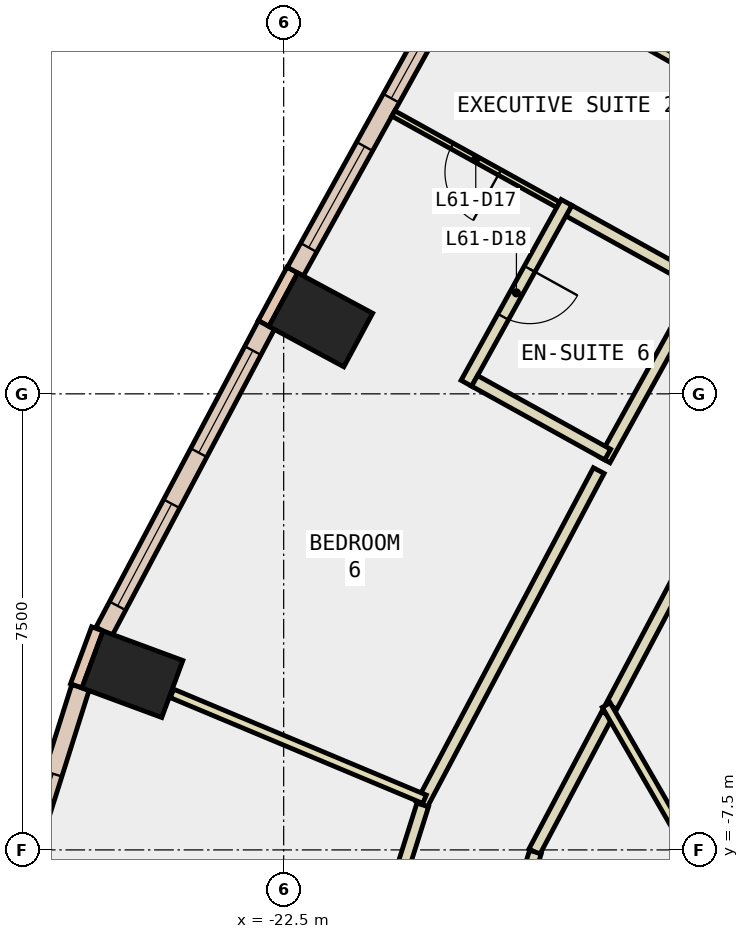
"""IFC4 building model, lengths in metres.
Left out: names, types, materials, properties, quantities, classifications, styles, units other than length and angle.
Written with IfcOpenShell. Run it as: python <this file> out.ifc"""

import sys

from ifc_helpers import new_model, si_unit, direction, frame, frame_2d, origin, origin_2d, place, context, subcontext, project, spatial, rectangle, extrude, element, fill, save


model = new_model("IFC4")
c1 = context("Model", 3, precision=1e-05, world=origin(), true_north=direction((0.0, 1.0)))
c2 = subcontext(c1, "Body", "Model", "MODEL_VIEW")
j1 = project(units=[si_unit("LENGTHUNIT", "METRE"), si_unit("PLANEANGLEUNIT", "RADIAN")], contexts=[c1])
p1 = place(None, origin())
s1 = spatial("IfcSite", under=j1, at=p1, CompositionType="ELEMENT")
p2 = place(p1, origin())
s2 = spatial("IfcBuilding", under=s1, at=p2, CompositionType="ELEMENT")
p3 = place(p2, frame((0.0, 0.0, 266.6)))
s3 = spatial("IfcBuildingStorey", under=s2, at=p3, CompositionType="ELEMENT", Elevation=266.6)
for number, where, z_axis, x_axis in (
    (1, (-21.89, 1.217, -0.34), (0.0, 0.0, 1.0), (0.474, 0.881, 0.0)),
    (2, (-24.988, -4.611, -0.34), (0.0, 0.0, 1.0), (0.347, 0.938, 0.0)),
):
    element("IfcColumn", number, at=place(p3, frame(where, z_axis=z_axis, x_axis=x_axis)), inside=s3, PredefinedType="COLUMN", context=c2, shape_type="SweptSolid", body=[
        extrude(rectangle(XDim=1.0, YDim=1.4, at=origin_2d()), origin(), (0.0, 0.0, 1.0), 3.6),
    ])
p4 = place(p3, frame((-22.357, 2.037, 0.0), z_axis=(0.0, 0.0, 1.0), x_axis=(-0.473852444207, -0.880604259085, 0.0)))
e3 = element("IfcWall", 3, at=p4, inside=s3, PredefinedType="STANDARD", context=c2, shape_type="SweptSolid", body=[
    extrude(rectangle(XDim=1.0, YDim=0.2, at=frame_2d((0.5, 0.0))), origin(), (0.0, 0.0, 1.0), 3.26),
])
p5 = place(p3, frame((-25.565, -3.865, 0.0), z_axis=(0.0, 0.0, 1.0), x_axis=(-0.347107644204, -0.937825294677, 0.0)))
e4 = element("IfcWall", 4, at=p5, inside=s3, PredefinedType="STANDARD", context=c2, shape_type="SweptSolid", body=[
    extrude(rectangle(XDim=1.0, YDim=0.2, at=frame_2d((0.5, 0.0))), origin(), (0.0, 0.0, 1.0), 3.26),
])
p6 = place(p3, frame((-19.591, 6.919, 0.0), z_axis=(0.0, 0.0, 1.0), x_axis=(-0.484260568952, -0.874923826032, 0.0)))
e5 = element("IfcWall", 5, at=p6, inside=s3, PredefinedType="STANDARD", context=c2, shape_type="SweptSolid", body=[
    extrude(rectangle(XDim=5.611, YDim=0.3, at=frame_2d((2.805, 0.0))), origin(), (0.0, 0.0, 1.0), 3.26),
])
p7 = place(p6, frame((0.453, 0.0, 0.9)))
e6 = element("IfcOpeningElement", 6, at=p7, cuts=e5, PredefinedType="OPENING", context=c2, shape_type="SweptSolid", body=[
    extrude(rectangle(XDim=1.9, YDim=2.0, at=frame_2d((0.95, 1.0))), frame((0.0, 0.16, 0.0), z_axis=(0.0, -1.0, 0.0), x_axis=(1.0, 0.0, 0.0)), (0.0, 0.0, 1.0), 0.32),
])
p8 = place(p6, frame((3.258, 0.0, 0.9)))
e7 = element("IfcOpeningElement", 7, at=p8, cuts=e5, PredefinedType="OPENING", context=c2, shape_type="SweptSolid", body=[
    extrude(rectangle(XDim=1.9, YDim=2.0, at=frame_2d((0.95, 1.0))), frame((0.0, 0.16, 0.0), z_axis=(0.0, -1.0, 0.0), x_axis=(1.0, 0.0, 0.0)), (0.0, 0.0, 1.0), 0.32),
])
p9 = place(p3, frame((-22.784, 1.132, 0.0), z_axis=(0.0, 0.0, 1.0), x_axis=(-0.468220106253, -0.883611867338, 0.0)))
e8 = element("IfcWall", 8, at=p9, inside=s3, PredefinedType="STANDARD", context=c2, shape_type="SweptSolid", body=[
    extrude(rectangle(XDim=5.703, YDim=0.3, at=frame_2d((2.852, 0.0))), origin(), (0.0, 0.0, 1.0), 3.26),
])
p10 = place(p9, frame((0.476, 0.0, 0.9)))
e9 = element("IfcOpeningElement", 9, at=p10, cuts=e8, PredefinedType="OPENING", context=c2, shape_type="SweptSolid", body=[
    extrude(rectangle(XDim=1.9, YDim=2.0, at=frame_2d((0.95, 1.0))), frame((0.0, 0.16, 0.0), z_axis=(0.0, -1.0, 0.0), x_axis=(1.0, 0.0, 0.0)), (0.0, 0.0, 1.0), 0.32),
])
p11 = place(p9, frame((3.327, 0.0, 0.9)))
e10 = element("IfcOpeningElement", 10, at=p11, cuts=e8, PredefinedType="OPENING", context=c2, shape_type="SweptSolid", body=[
    extrude(rectangle(XDim=1.9, YDim=2.0, at=frame_2d((0.95, 1.0))), frame((0.0, 0.16, 0.0), z_axis=(0.0, -1.0, 0.0), x_axis=(1.0, 0.0, 0.0)), (0.0, 0.0, 1.0), 0.32),
])
p12 = place(p3, frame((-25.842, -4.827, 0.0), z_axis=(0.0, 0.0, 1.0), x_axis=(-0.30108868778, -0.953596142028, 0.0)))
e11 = element("IfcWall", 11, at=p12, inside=s3, PredefinedType="STANDARD", context=c2, shape_type="SweptSolid", body=[
    extrude(rectangle(XDim=4.38, YDim=0.3, at=frame_2d((2.19, 0.0))), origin(), (0.0, 0.0, 1.0), 3.26),
])
p13 = place(p12, frame((1.49, 0.0, 0.9)))
e12 = element("IfcOpeningElement", 12, at=p13, cuts=e11, PredefinedType="OPENING", context=c2, shape_type="SweptSolid", body=[
    extrude(rectangle(XDim=1.4, YDim=2.0, at=frame_2d((0.7, 1.0))), frame((0.0, 0.16, 0.0), z_axis=(0.0, -1.0, 0.0), x_axis=(1.0, 0.0, 0.0)), (0.0, 0.0, 1.0), 0.32),
])
p14 = place(p3, frame((-15.56, -2.214, 0.0), z_axis=(0.0, 0.0, 1.0), x_axis=(-0.468104679961, -0.883673021314, 0.0)))
e13 = element("IfcWall", 13, at=p14, inside=s3, PredefinedType="PARTITIONING", context=c2, shape_type="SweptSolid", body=[
    extrude(rectangle(XDim=3.309, YDim=0.2, at=frame_2d((1.654, 0.0))), origin(), (0.0, 0.0, 1.0), 3.26),
])
p15 = place(p3, frame((-17.18, -5.271, 0.0), z_axis=(0.0, 0.0, 1.0), x_axis=(-0.468212372113, -0.883615965564, 0.0)))
e14 = element("IfcWall", 14, at=p15, inside=s3, PredefinedType="PARTITIONING", context=c2, shape_type="SweptSolid", body=[
    extrude(rectangle(XDim=2.557, YDim=0.2, at=frame_2d((1.278, 0.0))), origin(), (0.0, 0.0, 1.0), 3.26),
])
p16 = place(p3, frame((-18.36, -7.537, 0.0), z_axis=(0.0, 0.0, 1.0), x_axis=(-0.301325410186, -0.953521366922, 0.0)))
e15 = element("IfcWall", 15, at=p16, inside=s3, PredefinedType="PARTITIONING", context=c2, shape_type="SweptSolid", body=[
    extrude(rectangle(XDim=2.469, YDim=0.2, at=frame_2d((1.234, 0.0))), origin(), (0.0, 0.0, 1.0), 3.26),
])
p17 = place(p3, frame((-20.229, -6.754, 0.0), z_axis=(0.0, 0.0, 1.0), x_axis=(0.468313568794, 0.883562335822, 0.0)))
e16 = element("IfcWall", 16, at=p17, inside=s3, PredefinedType="PARTITIONING", context=c2, shape_type="SweptSolid", body=[
    extrude(rectangle(XDim=6.216, YDim=0.2, at=frame_2d((3.108, 0.0))), origin(), (0.0, 0.0, 1.0), 3.26),
])
p18 = place(p3, frame((-17.221, -1.085, 0.0), z_axis=(0.0, 0.0, 1.0), x_axis=(0.48445041864, 0.874818719438, 0.0)))
e17 = element("IfcWall", 17, at=p18, inside=s3, PredefinedType="PARTITIONING", context=c2, shape_type="SweptSolid", body=[
    extrude(rectangle(XDim=3.2, YDim=0.2, at=frame_2d((1.6, 0.0))), origin(), (0.0, 0.0, 1.0), 3.26),
])
p19 = place(p3, frame((-21.18, -9.821, 0.0), z_axis=(0.0, 0.0, 1.0), x_axis=(0.301331608119, 0.953519408271, 0.0)))
e18 = element("IfcWall", 18, at=p19, inside=s3, PredefinedType="PARTITIONING", context=c2, shape_type="SweptSolid", body=[
    extrude(rectangle(XDim=3.209, YDim=0.2, at=frame_2d((1.604, 0.0))), origin(), (0.0, 0.0, 1.0), 3.26),
])
p20 = place(p3, frame((-15.427, -8.18, 0.0), z_axis=(0.0, 0.0, 1.0), x_axis=(-0.500045204515, 0.865999303373, 0.0)))
e19 = element("IfcWall", 19, at=p20, inside=s3, PredefinedType="PARTITIONING", context=c2, shape_type="SweptSolid", body=[
    extrude(rectangle(XDim=3.536, YDim=0.15, at=frame_2d((1.768, 0.0))), origin(), (0.0, 0.0, 1.0), 3.26),
])
p21 = place(p3, frame((-14.083, 4.377, 0.0), z_axis=(0.0, 0.0, 1.0), x_axis=(-0.870415885751, 0.492317159799, 0.0)))
e20 = element("IfcWall", 20, at=p21, inside=s3, PredefinedType="PARTITIONING", context=c2, shape_type="SweptSolid", body=[
    extrude(rectangle(XDim=4.581, YDim=0.15, at=frame_2d((2.29, 0.0))), origin(), (0.0, 0.0, 1.0), 3.26),
])
p22 = place(p3, frame((-17.985, 3.109, 0.0), z_axis=(0.0, 0.0, 1.0), x_axis=(-0.874762085098, 0.484552674614, 0.0)))
e21 = element("IfcWall", 21, at=p22, inside=s3, PredefinedType="PARTITIONING", context=c2, shape_type="SweptSolid", body=[
    extrude(rectangle(XDim=3.1, YDim=0.1, at=frame_2d((1.55, 0.0))), origin(), (0.0, 0.0, 1.0), 3.26),
])
p23 = place(p22, frame((1.1, 0.0, 0.0)))
e22 = element("IfcOpeningElement", 22, at=p23, cuts=e21, PredefinedType="OPENING", context=c2, shape_type="SweptSolid", body=[
    extrude(rectangle(XDim=0.9, YDim=2.1, at=frame_2d((0.45, 1.05))), frame((0.0, 0.06, 0.0), z_axis=(0.0, -1.0, 0.0), x_axis=(1.0, 0.0, 0.0)), (0.0, 0.0, 1.0), 0.12),
])
p24 = place(p3, frame((-15.71, 1.85, 0.0), z_axis=(0.0, 0.0, 1.0), x_axis=(-0.874842414173, 0.484407628308, 0.0)))
e23 = element("IfcWall", 23, at=p24, inside=s3, PredefinedType="PARTITIONING", context=c2, shape_type="SweptSolid", body=[
    extrude(rectangle(XDim=2.401, YDim=0.2, at=frame_2d((1.2, 0.0))), origin(), (0.0, 0.0, 1.0), 3.26),
])
p25 = place(p3, frame((-17.849, 3.148, 0.0), z_axis=(0.0, 0.0, 1.0), x_axis=(-0.484257957482, -0.874925271446, 0.0)))
e24 = element("IfcWall", 24, at=p25, inside=s3, PredefinedType="PARTITIONING", context=c2, shape_type="SweptSolid", body=[
    extrude(rectangle(XDim=3.399, YDim=0.2, at=frame_2d((1.699, 0.0))), origin(), (0.0, 0.0, 1.0), 3.26),
])
p26 = place(p25, frame((1.25, 0.0, 0.0)))
e25 = element("IfcOpeningElement", 25, at=p26, cuts=e24, PredefinedType="OPENING", context=c2, shape_type="SweptSolid", body=[
    extrude(rectangle(XDim=0.9, YDim=2.1, at=frame_2d((0.45, 1.05))), frame((0.0, 0.11, 0.0), z_axis=(0.0, -1.0, 0.0), x_axis=(1.0, 0.0, 0.0)), (0.0, 0.0, 1.0), 0.22),
])
p27 = place(p3, frame((-19.36, 0.213, 0.0), z_axis=(0.0, 0.0, 1.0), x_axis=(0.874939003568, -0.484233146362, 0.0)))
e26 = element("IfcWall", 26, at=p27, inside=s3, PredefinedType="PARTITIONING", context=c2, shape_type="SweptSolid", body=[
    extrude(rectangle(XDim=2.501, YDim=0.2, at=frame_2d((1.25, 0.0))), origin(), (0.0, 0.0, 1.0), 3.26),
])
p28 = place(p3, frame((-20.183, -6.666, 0.0), z_axis=(0.0, 0.0, 1.0), x_axis=(-0.922347108299, 0.386362280525, 0.0)))
e27 = element("IfcWall", 27, at=p28, inside=s3, PredefinedType="PARTITIONING", context=c2, shape_type="SweptSolid", body=[
    extrude(rectangle(XDim=4.503, YDim=0.15, at=frame_2d((2.252, 0.0))), origin(), (0.0, 0.0, 1.0), 3.26),
])
p29 = place(p7, origin())
e28 = element("IfcWindow", 28, at=p29, inside=s3, PartitioningType="SINGLE_PANEL", PredefinedType="WINDOW", context=c2, shape_type="SweptSolid", body=[
    extrude(rectangle(XDim=1.9, YDim=2.0, at=frame_2d((0.95, 1.0))), frame((0.0, 0.03, 0.0), z_axis=(0.0, -1.0, 0.0), x_axis=(1.0, 0.0, 0.0)), (0.0, 0.0, 1.0), 0.06),
])
fill(e6, e28)
p30 = place(p8, origin())
e29 = element("IfcWindow", 29, at=p30, inside=s3, PartitioningType="SINGLE_PANEL", PredefinedType="WINDOW", context=c2, shape_type="SweptSolid", body=[
    extrude(rectangle(XDim=1.9, YDim=2.0, at=frame_2d((0.95, 1.0))), frame((0.0, 0.03, 0.0), z_axis=(0.0, -1.0, 0.0), x_axis=(1.0, 0.0, 0.0)), (0.0, 0.0, 1.0), 0.06),
])
fill(e7, e29)
p31 = place(p10, origin())
e30 = element("IfcWindow", 30, at=p31, inside=s3, PartitioningType="SINGLE_PANEL", PredefinedType="WINDOW", context=c2, shape_type="SweptSolid", body=[
    extrude(rectangle(XDim=1.9, YDim=2.0, at=frame_2d((0.95, 1.0))), frame((0.0, 0.03, 0.0), z_axis=(0.0, -1.0, 0.0), x_axis=(1.0, 0.0, 0.0)), (0.0, 0.0, 1.0), 0.06),
])
fill(e9, e30)
p32 = place(p11, origin())
e31 = element("IfcWindow", 31, at=p32, inside=s3, PartitioningType="SINGLE_PANEL", PredefinedType="WINDOW", context=c2, shape_type="SweptSolid", body=[
    extrude(rectangle(XDim=1.9, YDim=2.0, at=frame_2d((0.95, 1.0))), frame((0.0, 0.03, 0.0), z_axis=(0.0, -1.0, 0.0), x_axis=(1.0, 0.0, 0.0)), (0.0, 0.0, 1.0), 0.06),
])
fill(e10, e31)
p33 = place(p13, origin())
e32 = element("IfcWindow", 32, at=p33, inside=s3, PartitioningType="SINGLE_PANEL", PredefinedType="WINDOW", context=c2, shape_type="SweptSolid", body=[
    extrude(rectangle(XDim=1.4, YDim=2.0, at=frame_2d((0.7, 1.0))), frame((0.0, 0.03, 0.0), z_axis=(0.0, -1.0, 0.0), x_axis=(1.0, 0.0, 0.0)), (0.0, 0.0, 1.0), 0.06),
])
fill(e12, e32)
p34 = place(p23, origin())
e33 = element("IfcDoor", 33, at=p34, inside=s3, OperationType="SINGLE_SWING_LEFT", PredefinedType="DOOR", context=c2, shape_type="SweptSolid", body=[
    extrude(rectangle(XDim=0.9, YDim=2.1, at=frame_2d((0.45, 1.05))), frame((0.0, 0.025, 0.0), z_axis=(0.0, -1.0, 0.0), x_axis=(1.0, 0.0, 0.0)), (0.0, 0.0, 1.0), 0.05),
])
fill(e22, e33)
p35 = place(p26, origin())
e34 = element("IfcDoor", 34, at=p35, inside=s3, OperationType="SINGLE_SWING_LEFT", PredefinedType="DOOR", context=c2, shape_type="SweptSolid", body=[
    extrude(rectangle(XDim=0.9, YDim=2.1, at=frame_2d((0.45, 1.05))), frame((0.0, 0.025, 0.0), z_axis=(0.0, -1.0, 0.0), x_axis=(1.0, 0.0, 0.0)), (0.0, 0.0, 1.0), 0.05),
])
fill(e25, e34)
save(model, sys.argv[1])
